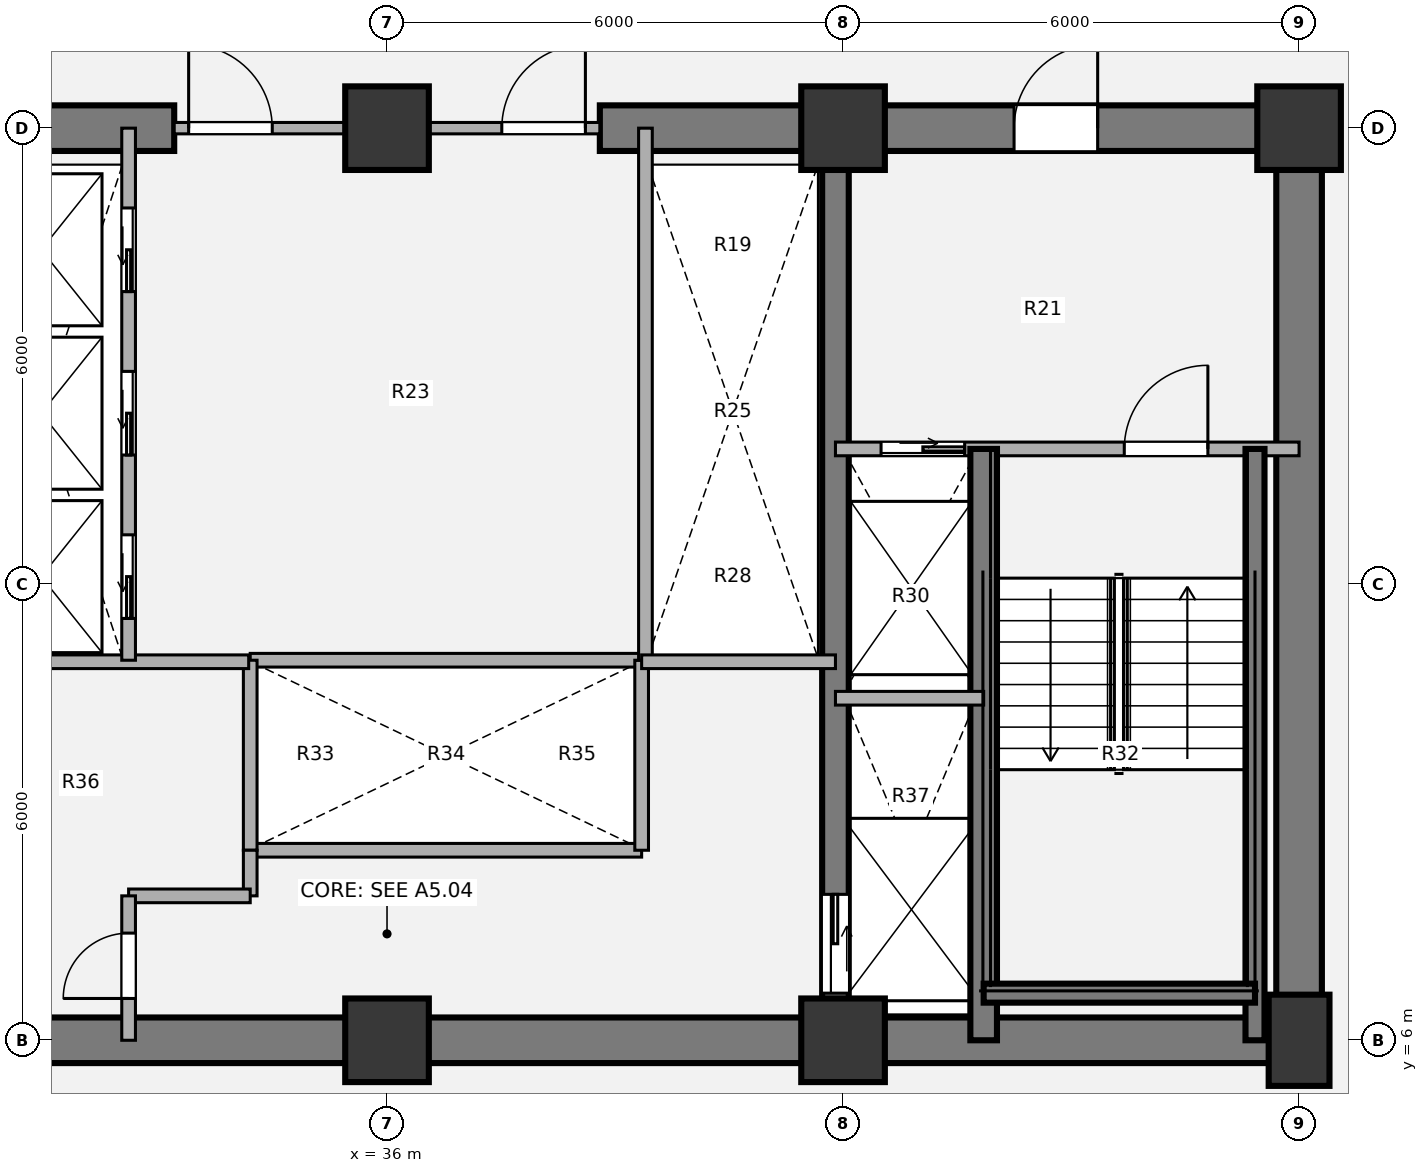
"""IFC4 building model, lengths in metres.
Left out: names, types, materials, properties, quantities, classifications, styles, units other than length and angle.
Written with IfcOpenShell. Run it as: python <this file> out.ifc"""

import sys

from ifc_helpers import new_model, si_unit, direction, frame, frame_2d, origin, origin_2d, place, context, subcontext, project, spatial, rectangle, extrude, source, transform, mapped, element, fill, save


model = new_model("IFC4")
c1 = context("Model", 3, precision=1e-05, world=origin(), true_north=direction((0.0, 1.0)))
c2 = subcontext(c1, "Body", "Model", "MODEL_VIEW")
j1 = project(units=[si_unit("LENGTHUNIT", "METRE"), si_unit("PLANEANGLEUNIT", "RADIAN")], contexts=[c1])
p1 = place(None, origin())
s1 = spatial("IfcSite", under=j1, at=p1, CompositionType="ELEMENT")
p2 = place(p1, origin())
s2 = spatial("IfcBuilding", under=s1, at=p2, CompositionType="ELEMENT")
p3 = place(p2, frame((0.0, 0.0, 72.36)))
s3 = spatial("IfcBuildingStorey", under=s2, at=p3, CompositionType="ELEMENT", Elevation=72.36)
m1 = source(origin(), c2, "Body", "SweptSolid", [
    extrude(rectangle(XDim=1.1, YDim=1.1, at=origin_2d()), origin(), (0.0, 0.0, 1.0), 3.78),
])
for number, where, z_axis, x_axis in (
    (1, (36.0, 6.0, 0.0), (0.0, 0.0, 1.0), (1.0, 0.0, 0.0)),
    (2, (42.0, 6.0, 0.0), (0.0, 0.0, 1.0), (1.0, 0.0, 0.0)),
):
    element("IfcColumn", number, at=place(p3, frame(where, z_axis=z_axis, x_axis=x_axis)), inside=s3, PredefinedType="COLUMN", context=c2, shape_type="MappedRepresentation", body=[
        mapped(m1, transform((0.0, 0.0, 0.0), x_axis=(1.0, 0.0, 0.0), y_axis=(0.0, 1.0, 0.0), z_axis=(0.0, 0.0, 1.0), scale=1.0)),
    ])
m2 = source(origin(), c2, "Body", "SweptSolid", [
    extrude(rectangle(XDim=0.8, YDim=1.2, at=origin_2d()), origin(), (0.0, 0.0, 1.0), 3.78),
])
p4 = place(p3, frame((48.0, 6.0, 0.0), z_axis=(0.0, 0.0, 1.0), x_axis=(1.0, 0.0, 0.0)))
e3 = element("IfcColumn", 3, at=p4, inside=s3, PredefinedType="COLUMN", context=c2, shape_type="MappedRepresentation", body=[
    mapped(m2, transform((0.0, 0.0, 0.0), x_axis=(1.0, 0.0, 0.0), y_axis=(0.0, 1.0, 0.0), z_axis=(0.0, 0.0, 1.0), scale=1.0)),
])
for number, where, z_axis, x_axis in (
    (4, (36.0, 18.0, 0.0), (0.0, 0.0, 1.0), (1.0, 0.0, 0.0)),
    (5, (42.0, 18.0, 0.0), (0.0, 0.0, 1.0), (1.0, 0.0, 0.0)),
    (6, (48.0, 18.0, 0.0), (0.0, 0.0, 1.0), (1.0, 0.0, 0.0)),
):
    element("IfcColumn", number, at=place(p3, frame(where, z_axis=z_axis, x_axis=x_axis)), inside=s3, PredefinedType="COLUMN", context=c2, shape_type="MappedRepresentation", body=[
        mapped(m1, transform((0.0, 0.0, 0.0), x_axis=(1.0, 0.0, 0.0), y_axis=(0.0, 1.0, 0.0), z_axis=(0.0, 0.0, 1.0), scale=1.0)),
    ])
p5 = place(p3, frame((48.3, 6.0, 0.0), z_axis=(0.0, 0.0, 1.0), x_axis=(-1.0, 0.0, 0.0)))
e7 = element("IfcWall", 7, at=p5, inside=s3, PredefinedType="SHEAR", context=c2, shape_type="SweptSolid", body=[
    extrude(rectangle(XDim=24.6, YDim=0.6, at=frame_2d((12.3, 0.0))), origin(), (0.0, 0.0, 1.0), 3.78),
])
p6 = place(p3, frame((48.0, 18.0, 0.0), z_axis=(0.0, 0.0, 1.0), x_axis=(0.0, -1.0, 0.0)))
e8 = element("IfcWall", 8, at=p6, inside=s3, PredefinedType="SHEAR", context=c2, shape_type="SweptSolid", body=[
    extrude(rectangle(XDim=12.0, YDim=0.6, at=frame_2d((6.0, 0.0))), origin(), (0.0, 0.0, 1.0), 3.78),
])
p7 = place(p3, frame((23.7, 18.0, 0.0), z_axis=(0.0, 0.0, 1.0), x_axis=(1.0, 0.0, 0.0)))
e9 = element("IfcWall", 9, at=p7, inside=s3, PredefinedType="SHEAR", context=c2, shape_type="SweptSolid", body=[
    extrude(rectangle(XDim=9.5, YDim=0.6, at=frame_2d((4.75, 0.0))), origin(), (0.0, 0.0, 1.0), 3.78),
])
p8 = place(p7, frame((2.95, 0.0, 0.0)))
e10 = element("IfcOpeningElement", 10, at=p8, cuts=e9, PredefinedType="OPENING", context=c2, shape_type="SweptSolid", body=[
    extrude(rectangle(XDim=1.1, YDim=2.1, at=origin_2d()), frame((0.55, 0.31, 1.05), z_axis=(0.0, -1.0, 0.0), x_axis=(1.0, 0.0, 0.0)), (0.0, 0.0, 1.0), 0.62),
])
p9 = place(p3, frame((38.8, 18.0, 0.0), z_axis=(0.0, 0.0, 1.0), x_axis=(1.0, 0.0, 0.0)))
e11 = element("IfcWall", 11, at=p9, inside=s3, PredefinedType="SHEAR", context=c2, shape_type="SweptSolid", body=[
    extrude(rectangle(XDim=9.5, YDim=0.6, at=frame_2d((4.75, 0.0))), origin(), (0.0, 0.0, 1.0), 3.78),
])
p10 = place(p9, frame((5.45, 0.0, 0.0)))
e12 = element("IfcOpeningElement", 12, at=p10, cuts=e11, PredefinedType="OPENING", context=c2, shape_type="SweptSolid", body=[
    extrude(rectangle(XDim=1.1, YDim=2.1, at=origin_2d()), frame((0.55, 0.31, 1.05), z_axis=(0.0, -1.0, 0.0), x_axis=(1.0, 0.0, 0.0)), (0.0, 0.0, 1.0), 0.62),
])
p11 = place(p3, frame((41.9, 18.0, 0.0), z_axis=(0.0, 0.0, 1.0), x_axis=(0.0, -1.0, 0.0)))
e13 = element("IfcWall", 13, at=p11, inside=s3, PredefinedType="SHEAR", context=c2, shape_type="SweptSolid", body=[
    extrude(rectangle(XDim=12.0, YDim=0.35, at=frame_2d((6.0, 0.0))), origin(), (0.0, 0.0, 1.0), 3.78),
])
p12 = place(p11, frame((10.08, 0.0, 0.0)))
e14 = element("IfcOpeningElement", 14, at=p12, cuts=e13, PredefinedType="OPENING", context=c2, shape_type="SweptSolid", body=[
    extrude(rectangle(XDim=1.3, YDim=2.1, at=origin_2d()), frame((0.65, 0.185, 1.05), z_axis=(0.0, -1.0, 0.0), x_axis=(1.0, 0.0, 0.0)), (0.0, 0.0, 1.0), 0.37),
])
for number, where, z_axis, x_axis in (
    (15, (34.2, 11.0, 0.0), (0.0, 0.0, 1.0), (1.0, 0.0, 0.0)),
    (16, (34.2, 8.5, 0.0), (0.0, 0.0, 1.0), (1.0, 0.0, 0.0)),
):
    element("IfcWall", number, at=place(p3, frame(where, z_axis=z_axis, x_axis=x_axis)), inside=s3, PredefinedType="PARTITIONING", context=c2, shape_type="SweptSolid", body=[
        extrude(rectangle(XDim=5.15, YDim=0.18, at=frame_2d((2.575, 0.0))), origin(), (0.0, 0.0, 1.0), 3.5),
    ])
for number, where, z_axis, x_axis in (
    (17, (34.2, 8.5, 0.0), (0.0, 0.0, 1.0), (0.0, 1.0, 0.0)),
    (18, (39.35, 8.5, 0.0), (0.0, 0.0, 1.0), (0.0, 1.0, 0.0)),
):
    element("IfcWall", number, at=place(p3, frame(where, z_axis=z_axis, x_axis=x_axis)), inside=s3, PredefinedType="PARTITIONING", context=c2, shape_type="SweptSolid", body=[
        extrude(rectangle(XDim=2.5, YDim=0.18, at=frame_2d((1.25, 0.0))), origin(), (0.0, 0.0, 1.0), 3.5),
    ])
p13 = place(p3, frame((39.4, 11.0, 0.0), z_axis=(0.0, 0.0, 1.0), x_axis=(0.0, 1.0, 0.0)))
e19 = element("IfcWall", 19, at=p13, inside=s3, PredefinedType="PARTITIONING", context=c2, shape_type="SweptSolid", body=[
    extrude(rectangle(XDim=7.0, YDim=0.18, at=frame_2d((3.5, 0.0))), origin(), (0.0, 0.0, 1.0), 3.5),
])
p14 = place(p3, frame((30.1, 10.98, 0.0), z_axis=(0.0, 0.0, 1.0), x_axis=(1.0, 0.0, 0.0)))
e20 = element("IfcWall", 20, at=p14, inside=s3, PredefinedType="PARTITIONING", context=c2, shape_type="SweptSolid", body=[
    extrude(rectangle(XDim=4.08, YDim=0.18, at=frame_2d((2.04, 0.0))), origin(), (0.0, 0.0, 1.0), 3.5),
])
p15 = place(p3, frame((34.2, 7.9, 0.0), z_axis=(0.0, 0.0, 1.0), x_axis=(0.0, 1.0, 0.0)))
e21 = element("IfcWall", 21, at=p15, inside=s3, PredefinedType="PARTITIONING", context=c2, shape_type="SweptSolid", body=[
    extrude(rectangle(XDim=0.6, YDim=0.18, at=frame_2d((0.3, 0.0))), origin(), (0.0, 0.0, 1.0), 3.5),
])
p16 = place(p3, frame((32.6, 7.9, 0.0), z_axis=(0.0, 0.0, 1.0), x_axis=(1.0, 0.0, 0.0)))
e22 = element("IfcWall", 22, at=p16, inside=s3, PredefinedType="PARTITIONING", context=c2, shape_type="SweptSolid", body=[
    extrude(rectangle(XDim=1.6, YDim=0.18, at=frame_2d((0.8, 0.0))), origin(), (0.0, 0.0, 1.0), 3.5),
])
p17 = place(p3, frame((32.6, 6.0, 0.0), z_axis=(0.0, 0.0, 1.0), x_axis=(0.0, 1.0, 0.0)))
e23 = element("IfcWall", 23, at=p17, inside=s3, PredefinedType="PARTITIONING", context=c2, shape_type="SweptSolid", body=[
    extrude(rectangle(XDim=1.9, YDim=0.18, at=frame_2d((0.95, 0.0))), origin(), (0.0, 0.0, 1.0), 3.5),
])
p18 = place(p17, frame((0.55, 0.0, 0.0)))
e24 = element("IfcOpeningElement", 24, at=p18, cuts=e23, PredefinedType="OPENING", context=c2, shape_type="SweptSolid", body=[
    extrude(rectangle(XDim=0.86, YDim=2.1, at=origin_2d()), frame((0.43, 0.1, 1.05), z_axis=(0.0, -1.0, 0.0), x_axis=(1.0, 0.0, 0.0)), (0.0, 0.0, 1.0), 0.2),
])
p19 = place(p3, frame((39.35, 10.98, 0.0), z_axis=(0.0, 0.0, 1.0), x_axis=(1.0, 0.0, 0.0)))
e25 = element("IfcWall", 25, at=p19, inside=s3, PredefinedType="PARTITIONING", context=c2, shape_type="SweptSolid", body=[
    extrude(rectangle(XDim=2.55, YDim=0.18, at=frame_2d((1.275, 0.0))), origin(), (0.0, 0.0, 1.0), 3.5),
])
p20 = place(p3, frame((33.2, 18.0, 0.0), z_axis=(0.0, 0.0, 1.0), x_axis=(1.0, 0.0, 0.0)))
e26 = element("IfcWall", 26, at=p20, inside=s3, PredefinedType="PARTITIONING", context=c2, shape_type="SweptSolid", body=[
    extrude(rectangle(XDim=5.6, YDim=0.15, at=frame_2d((2.8, 0.0))), origin(), (0.0, 0.0, 1.0), 2.315),
])
p21 = place(p20, frame((0.19, 0.0, 0.0)))
e27 = element("IfcOpeningElement", 27, at=p21, cuts=e26, PredefinedType="OPENING", context=c2, shape_type="SweptSolid", body=[
    extrude(rectangle(XDim=1.1, YDim=2.1, at=origin_2d()), frame((0.55, 0.085, 1.05), z_axis=(0.0, -1.0, 0.0), x_axis=(1.0, 0.0, 0.0)), (0.0, 0.0, 1.0), 0.17),
])
p22 = place(p20, frame((4.31, 0.0, 0.0)))
e28 = element("IfcOpeningElement", 28, at=p22, cuts=e26, PredefinedType="OPENING", context=c2, shape_type="SweptSolid", body=[
    extrude(rectangle(XDim=1.1, YDim=2.1, at=origin_2d()), frame((0.55, 0.085, 1.05), z_axis=(0.0, -1.0, 0.0), x_axis=(1.0, 0.0, 0.0)), (0.0, 0.0, 1.0), 0.17),
])
p23 = place(p3, frame((41.9, 13.78, 0.0), z_axis=(0.0, 0.0, 1.0), x_axis=(1.0, 0.0, 0.0)))
e29 = element("IfcWall", 29, at=p23, inside=s3, PredefinedType="PARTITIONING", context=c2, shape_type="SweptSolid", body=[
    extrude(rectangle(XDim=6.1, YDim=0.18, at=frame_2d((3.05, 0.0))), origin(), (0.0, 0.0, 1.0), 3.5),
])
p24 = place(p23, frame((0.6, 0.0, 0.0)))
e30 = element("IfcOpeningElement", 30, at=p24, cuts=e29, PredefinedType="OPENING", context=c2, shape_type="SweptSolid", body=[
    extrude(rectangle(XDim=1.1, YDim=2.1, at=origin_2d()), frame((0.55, 0.1, 1.05), z_axis=(0.0, -1.0, 0.0), x_axis=(1.0, 0.0, 0.0)), (0.0, 0.0, 1.0), 0.2),
])
p25 = place(p23, frame((3.8, 0.0, 0.0)))
e31 = element("IfcOpeningElement", 31, at=p25, cuts=e29, PredefinedType="OPENING", context=c2, shape_type="SweptSolid", body=[
    extrude(rectangle(XDim=1.1, YDim=2.1, at=origin_2d()), frame((0.55, 0.1, 1.05), z_axis=(0.0, -1.0, 0.0), x_axis=(1.0, 0.0, 0.0)), (0.0, 0.0, 1.0), 0.2),
])
p26 = place(p3, frame((43.85, 6.0, 0.0), z_axis=(0.0, 0.0, 1.0), x_axis=(0.0, 1.0, 0.0)))
e32 = element("IfcWall", 32, at=p26, inside=s3, PredefinedType="SHEAR", context=c2, shape_type="SweptSolid", body=[
    extrude(rectangle(XDim=7.78, YDim=0.35, at=frame_2d((3.89, 0.0))), origin(), (0.0, 0.0, 1.0), 3.85),
])
p27 = place(p3, frame((47.42, 6.0, 0.0), z_axis=(0.0, 0.0, 1.0), x_axis=(0.0, 1.0, 0.0)))
e33 = element("IfcWall", 33, at=p27, inside=s3, PredefinedType="SHEAR", context=c2, shape_type="SweptSolid", body=[
    extrude(rectangle(XDim=7.78, YDim=0.25, at=frame_2d((3.89, 0.0))), origin(), (0.0, 0.0, 1.0), 3.85),
])
p28 = place(p3, frame((43.85, 6.62, 0.0), z_axis=(0.0, 0.0, 1.0), x_axis=(1.0, 0.0, 0.0)))
e34 = element("IfcWall", 34, at=p28, inside=s3, PredefinedType="SHEAR", context=c2, shape_type="SweptSolid", body=[
    extrude(rectangle(XDim=3.57, YDim=0.25, at=frame_2d((1.785, 0.0))), origin(), (0.0, 0.0, 1.0), 3.85),
])
p29 = place(p3, frame((41.9, 10.5, 0.0), z_axis=(0.0, 0.0, 1.0), x_axis=(1.0, 0.0, 0.0)))
e35 = element("IfcWall", 35, at=p29, inside=s3, PredefinedType="PARTITIONING", context=c2, shape_type="SweptSolid", body=[
    extrude(rectangle(XDim=1.95, YDim=0.18, at=frame_2d((0.975, 0.0))), origin(), (0.0, 0.0, 1.0), 3.5),
])
p30 = place(p3, frame((32.6, 11.0, 0.0), z_axis=(0.0, 0.0, 1.0), x_axis=(0.0, 1.0, 0.0)))
e36 = element("IfcWall", 36, at=p30, inside=s3, PredefinedType="PARTITIONING", context=c2, shape_type="SweptSolid", body=[
    extrude(rectangle(XDim=7.0, YDim=0.18, at=frame_2d((3.5, 0.0))), origin(), (0.0, 0.0, 1.0), 3.5),
])
p31 = place(p30, frame((0.55, 0.0, 0.0)))
e37 = element("IfcOpeningElement", 37, at=p31, cuts=e36, PredefinedType="OPENING", context=c2, shape_type="SweptSolid", body=[
    extrude(rectangle(XDim=1.1, YDim=2.1, at=origin_2d()), frame((0.55, 0.1, 1.05), z_axis=(0.0, -1.0, 0.0), x_axis=(1.0, 0.0, 0.0)), (0.0, 0.0, 1.0), 0.2),
])
p32 = place(p30, frame((2.7, 0.0, 0.0)))
e38 = element("IfcOpeningElement", 38, at=p32, cuts=e36, PredefinedType="OPENING", context=c2, shape_type="SweptSolid", body=[
    extrude(rectangle(XDim=1.1, YDim=2.1, at=origin_2d()), frame((0.55, 0.1, 1.05), z_axis=(0.0, -1.0, 0.0), x_axis=(1.0, 0.0, 0.0)), (0.0, 0.0, 1.0), 0.2),
])
p33 = place(p30, frame((4.85, 0.0, 0.0)))
e39 = element("IfcOpeningElement", 39, at=p33, cuts=e36, PredefinedType="OPENING", context=c2, shape_type="SweptSolid", body=[
    extrude(rectangle(XDim=1.1, YDim=2.1, at=origin_2d()), frame((0.55, 0.1, 1.05), z_axis=(0.0, -1.0, 0.0), x_axis=(1.0, 0.0, 0.0)), (0.0, 0.0, 1.0), 0.2),
])
m3 = source(origin(), c2, "Body", "SweptSolid", [
    extrude(rectangle(XDim=0.86, YDim=2.1, at=origin_2d()), frame((0.43, 0.025, 1.05), z_axis=(0.0, -1.0, 0.0), x_axis=(1.0, 0.0, 0.0)), (0.0, 0.0, 1.0), 0.05),
])
p34 = place(p18, origin())
e40 = element("IfcDoor", 40, at=p34, inside=s3, OperationType="SINGLE_SWING_LEFT", PredefinedType="DOOR", context=c2, shape_type="MappedRepresentation", body=[
    mapped(m3, transform((0.0, 0.0, 0.0), x_axis=(1.0, 0.0, 0.0), y_axis=(0.0, 1.0, 0.0), z_axis=(0.0, 0.0, 1.0), scale=1.0)),
])
fill(e24, e40)
m4 = source(origin(), c2, "Body", "SweptSolid", [
    extrude(rectangle(XDim=1.1, YDim=2.1, at=origin_2d()), frame((0.55, 0.025, 1.05), z_axis=(0.0, -1.0, 0.0), x_axis=(1.0, 0.0, 0.0)), (0.0, 0.0, 1.0), 0.05),
])
p35 = place(p21, origin())
e41 = element("IfcDoor", 41, at=p35, inside=s3, OperationType="SINGLE_SWING_LEFT", PredefinedType="DOOR", context=c2, shape_type="MappedRepresentation", body=[
    mapped(m4, transform((0.0, 0.0, 0.0), x_axis=(1.0, 0.0, 0.0), y_axis=(0.0, 1.0, 0.0), z_axis=(0.0, 0.0, 1.0), scale=1.0)),
])
fill(e27, e41)
p36 = place(p22, origin())
e42 = element("IfcDoor", 42, at=p36, inside=s3, OperationType="SINGLE_SWING_RIGHT", PredefinedType="DOOR", context=c2, shape_type="MappedRepresentation", body=[
    mapped(m4, transform((0.0, 0.0, 0.0), x_axis=(1.0, 0.0, 0.0), y_axis=(0.0, 1.0, 0.0), z_axis=(0.0, 0.0, 1.0), scale=1.0)),
])
fill(e28, e42)
m5 = source(origin(), c2, "Body", "SweptSolid", [
    extrude(rectangle(XDim=1.1, YDim=2.1, at=origin_2d()), frame((0.55, 0.025, 1.05), z_axis=(0.0, -1.0, 0.0), x_axis=(1.0, 0.0, 0.0)), (0.0, 0.0, 1.0), 0.05),
])
p37 = place(p24, origin())
e43 = element("IfcDoor", 43, at=p37, inside=s3, OperationType="SLIDING_TO_RIGHT", PredefinedType="DOOR", context=c2, shape_type="MappedRepresentation", body=[
    mapped(m5, transform((0.0, 0.0, 0.0), x_axis=(1.0, 0.0, 0.0), y_axis=(0.0, 1.0, 0.0), z_axis=(0.0, 0.0, 1.0), scale=1.0)),
])
fill(e30, e43)
m6 = source(origin(), c2, "Body", "SweptSolid", [
    extrude(rectangle(XDim=1.1, YDim=2.1, at=origin_2d()), frame((0.55, 0.025, 1.05), z_axis=(0.0, -1.0, 0.0), x_axis=(1.0, 0.0, 0.0)), (0.0, 0.0, 1.0), 0.05),
])
p38 = place(p25, origin())
e44 = element("IfcDoor", 44, at=p38, inside=s3, OperationType="SINGLE_SWING_RIGHT", PredefinedType="DOOR", context=c2, shape_type="MappedRepresentation", body=[
    mapped(m6, transform((0.0, 0.0, 0.0), x_axis=(1.0, 0.0, 0.0), y_axis=(0.0, 1.0, 0.0), z_axis=(0.0, 0.0, 1.0), scale=1.0)),
])
fill(e31, e44)
m7 = source(origin(), c2, "Body", "SweptSolid", [
    extrude(rectangle(XDim=1.3, YDim=2.1, at=origin_2d()), frame((0.65, 0.025, 1.05), z_axis=(0.0, -1.0, 0.0), x_axis=(1.0, 0.0, 0.0)), (0.0, 0.0, 1.0), 0.05),
])
p39 = place(p12, origin())
e45 = element("IfcDoor", 45, at=p39, inside=s3, OperationType="SLIDING_TO_LEFT", PredefinedType="DOOR", context=c2, shape_type="MappedRepresentation", body=[
    mapped(m7, transform((0.0, 0.0, 0.0), x_axis=(1.0, 0.0, 0.0), y_axis=(0.0, 1.0, 0.0), z_axis=(0.0, 0.0, 1.0), scale=1.0)),
])
fill(e14, e45)
p40 = place(p10, origin())
e46 = element("IfcDoor", 46, at=p40, inside=s3, OperationType="SINGLE_SWING_RIGHT", PredefinedType="DOOR", context=c2, shape_type="MappedRepresentation", body=[
    mapped(m4, transform((0.0, 0.0, 0.0), x_axis=(1.0, 0.0, 0.0), y_axis=(0.0, 1.0, 0.0), z_axis=(0.0, 0.0, 1.0), scale=1.0)),
])
fill(e12, e46)
p41 = place(p31, origin())
e47 = element("IfcDoor", 47, at=p41, inside=s3, OperationType="SLIDING_TO_LEFT", PredefinedType="DOOR", context=c2, shape_type="MappedRepresentation", body=[
    mapped(m5, transform((0.0, 0.0, 0.0), x_axis=(1.0, 0.0, 0.0), y_axis=(0.0, 1.0, 0.0), z_axis=(0.0, 0.0, 1.0), scale=1.0)),
])
fill(e37, e47)
p42 = place(p32, origin())
e48 = element("IfcDoor", 48, at=p42, inside=s3, OperationType="SLIDING_TO_LEFT", PredefinedType="DOOR", context=c2, shape_type="MappedRepresentation", body=[
    mapped(m5, transform((0.0, 0.0, 0.0), x_axis=(1.0, 0.0, 0.0), y_axis=(0.0, 1.0, 0.0), z_axis=(0.0, 0.0, 1.0), scale=1.0)),
])
fill(e38, e48)
p43 = place(p33, origin())
e49 = element("IfcDoor", 49, at=p43, inside=s3, OperationType="SLIDING_TO_LEFT", PredefinedType="DOOR", context=c2, shape_type="MappedRepresentation", body=[
    mapped(m5, transform((0.0, 0.0, 0.0), x_axis=(1.0, 0.0, 0.0), y_axis=(0.0, 1.0, 0.0), z_axis=(0.0, 0.0, 1.0), scale=1.0)),
])
fill(e39, e49)
save(model, sys.argv[1])
